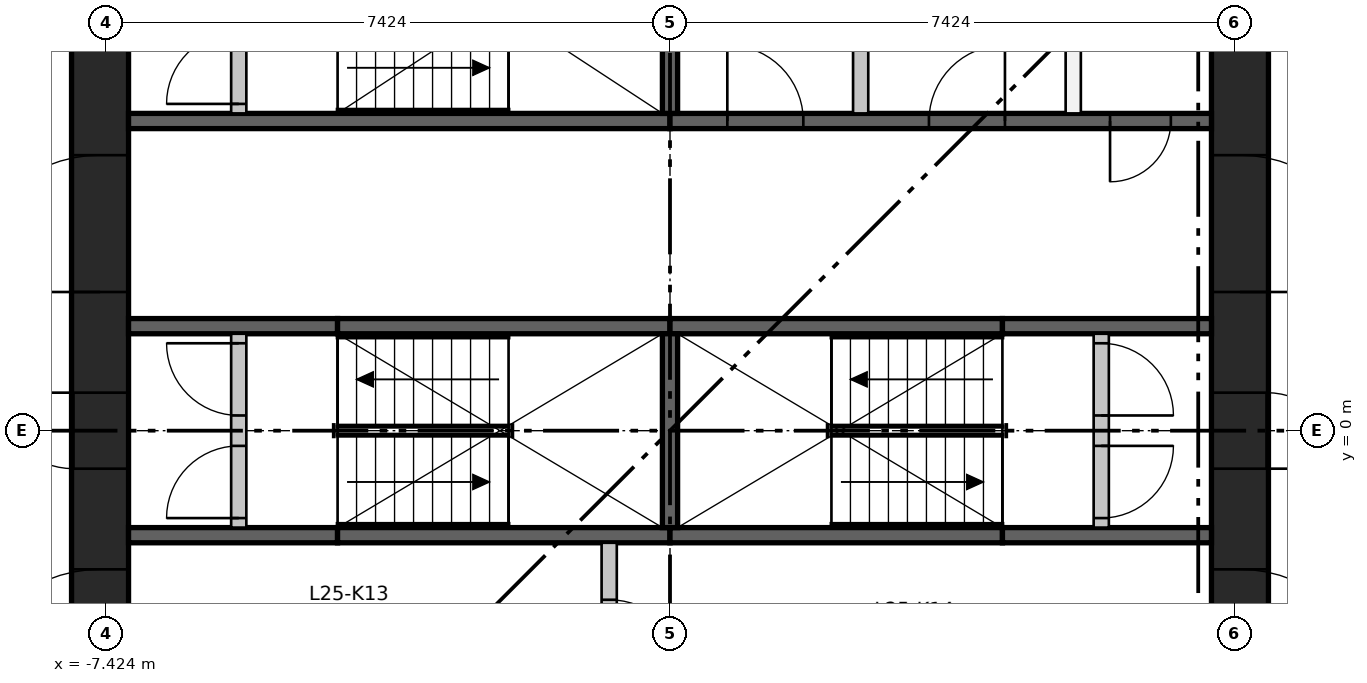
"""IFC4 building model, lengths in metres.
Left out: names, types, materials, properties, quantities, classifications, styles, units other than length and angle.
Written with IfcOpenShell. Run it as: python <this file> out.ifc"""

import sys

from ifc_helpers import new_model, si_unit, direction, frame, frame_2d, origin, place, context, subcontext, project, spatial, rectangle, extrude, element, fill, save


model = new_model("IFC4")
c1 = context("Model", 3, precision=1e-05, world=origin(), true_north=direction((0.0, 1.0)))
c2 = subcontext(c1, "Body", "Model", "MODEL_VIEW")
j1 = project(units=[si_unit("LENGTHUNIT", "METRE"), si_unit("PLANEANGLEUNIT", "RADIAN")], contexts=[c1])
p1 = place(None, origin())
s1 = spatial("IfcSite", under=j1, at=p1, CompositionType="ELEMENT")
p2 = place(p1, origin())
s2 = spatial("IfcBuilding", under=s1, at=p2, CompositionType="ELEMENT")
p3 = place(p2, frame((0.0, 0.0, 98.3)))
s3 = spatial("IfcBuildingStorey", under=s2, at=p3, CompositionType="ELEMENT", Elevation=98.3)
p4 = place(p3, frame((-7.499, -7.124, 0.0), z_axis=(0.0, 0.0, 1.0), x_axis=(0.0, 1.0, 0.0)))
e1 = element("IfcWall", 1, at=p4, inside=s3, PredefinedType="SHEAR", context=c2, shape_type="SweptSolid", body=[
    extrude(rectangle(XDim=14.248, YDim=0.75, at=frame_2d((7.124, 0.0))), origin(), (0.0, 0.0, 1.0), 3.65),
])
p5 = place(p4, frame((6.624, 0.0, 0.0)))
e2 = element("IfcOpeningElement", 2, at=p5, cuts=e1, PredefinedType="OPENING", context=c2, shape_type="SweptSolid", body=[
    extrude(rectangle(XDim=1.0, YDim=2.1, at=frame_2d((0.5, 1.05))), frame((0.0, 0.385, 0.0), z_axis=(0.0, -1.0, 0.0), x_axis=(1.0, 0.0, 0.0)), (0.0, 0.0, 1.0), 0.77),
])
p6 = place(p4, frame((3.5, 0.0, 0.0)))
e3 = element("IfcOpeningElement", 3, at=p6, cuts=e1, PredefinedType="OPENING", context=c2, shape_type="SweptSolid", body=[
    extrude(rectangle(XDim=1.8, YDim=2.1, at=frame_2d((0.9, 1.05))), frame((0.0, 0.385, 0.0), z_axis=(0.0, -1.0, 0.0), x_axis=(1.0, 0.0, 0.0)), (0.0, 0.0, 1.0), 0.77),
])
p7 = place(p4, frame((8.948, 0.0, 0.0)))
e4 = element("IfcOpeningElement", 4, at=p7, cuts=e1, PredefinedType="OPENING", context=c2, shape_type="SweptSolid", body=[
    extrude(rectangle(XDim=1.8, YDim=2.1, at=frame_2d((0.9, 1.05))), frame((0.0, 0.385, 0.0), z_axis=(0.0, -1.0, 0.0), x_axis=(1.0, 0.0, 0.0)), (0.0, 0.0, 1.0), 0.77),
])
p8 = place(p4, frame((12.124, 0.0, 0.0)))
e5 = element("IfcOpeningElement", 5, at=p8, cuts=e1, PredefinedType="OPENING", context=c2, shape_type="SweptSolid", body=[
    extrude(rectangle(XDim=1.0, YDim=2.1, at=frame_2d((0.5, 1.05))), frame((0.0, 0.385, 0.0), z_axis=(0.0, -1.0, 0.0), x_axis=(1.0, 0.0, 0.0)), (0.0, 0.0, 1.0), 0.77),
])
p9 = place(p3, frame((7.499, -7.124, 0.0), z_axis=(0.0, 0.0, 1.0), x_axis=(0.0, 1.0, 0.0)))
e6 = element("IfcWall", 6, at=p9, inside=s3, PredefinedType="SHEAR", context=c2, shape_type="SweptSolid", body=[
    extrude(rectangle(XDim=14.248, YDim=0.75, at=frame_2d((7.124, 0.0))), origin(), (0.0, 0.0, 1.0), 3.65),
])
p10 = place(p9, frame((6.624, 0.0, 0.0)))
e7 = element("IfcOpeningElement", 7, at=p10, cuts=e6, PredefinedType="OPENING", context=c2, shape_type="SweptSolid", body=[
    extrude(rectangle(XDim=1.0, YDim=2.1, at=frame_2d((0.5, 1.05))), frame((0.0, 0.385, 0.0), z_axis=(0.0, -1.0, 0.0), x_axis=(1.0, 0.0, 0.0)), (0.0, 0.0, 1.0), 0.77),
])
p11 = place(p9, frame((3.5, 0.0, 0.0)))
e8 = element("IfcOpeningElement", 8, at=p11, cuts=e6, PredefinedType="OPENING", context=c2, shape_type="SweptSolid", body=[
    extrude(rectangle(XDim=1.8, YDim=2.1, at=frame_2d((0.9, 1.05))), frame((0.0, 0.385, 0.0), z_axis=(0.0, -1.0, 0.0), x_axis=(1.0, 0.0, 0.0)), (0.0, 0.0, 1.0), 0.77),
])
p12 = place(p9, frame((8.948, 0.0, 0.0)))
e9 = element("IfcOpeningElement", 9, at=p12, cuts=e6, PredefinedType="OPENING", context=c2, shape_type="SweptSolid", body=[
    extrude(rectangle(XDim=1.8, YDim=2.1, at=frame_2d((0.9, 1.05))), frame((0.0, 0.385, 0.0), z_axis=(0.0, -1.0, 0.0), x_axis=(1.0, 0.0, 0.0)), (0.0, 0.0, 1.0), 0.77),
])
p13 = place(p3, frame((-7.124, 4.074, 0.0), z_axis=(0.0, 0.0, 1.0), x_axis=(1.0, 0.0, 0.0)))
e10 = element("IfcWall", 10, at=p13, inside=s3, PredefinedType="SHEAR", context=c2, shape_type="SweptSolid", body=[
    extrude(rectangle(XDim=7.124, YDim=0.2, at=frame_2d((3.562, 0.0))), origin(), (0.0, 0.0, 1.0), 3.3),
])
p14 = place(p3, frame((0.0, 4.074, 0.0), z_axis=(0.0, 0.0, 1.0), x_axis=(1.0, 0.0, 0.0)))
e11 = element("IfcWall", 11, at=p14, inside=s3, PredefinedType="SHEAR", context=c2, shape_type="SweptSolid", body=[
    extrude(rectangle(XDim=7.124, YDim=0.2, at=frame_2d((3.562, 0.0))), origin(), (0.0, 0.0, 1.0), 3.3),
])
p15 = place(p14, frame((0.754, 0.0, 0.0)))
e12 = element("IfcOpeningElement", 12, at=p15, cuts=e11, PredefinedType="OPENING", context=c2, shape_type="SweptSolid", body=[
    extrude(rectangle(XDim=1.0, YDim=2.1, at=frame_2d((0.5, 1.05))), frame((0.0, 0.11, 0.0), z_axis=(0.0, -1.0, 0.0), x_axis=(1.0, 0.0, 0.0)), (0.0, 0.0, 1.0), 0.22),
])
p16 = place(p14, frame((3.407, 0.0, 0.0)))
e13 = element("IfcOpeningElement", 13, at=p16, cuts=e11, PredefinedType="OPENING", context=c2, shape_type="SweptSolid", body=[
    extrude(rectangle(XDim=1.0, YDim=2.1, at=frame_2d((0.5, 1.05))), frame((0.0, 0.11, 0.0), z_axis=(0.0, -1.0, 0.0), x_axis=(1.0, 0.0, 0.0)), (0.0, 0.0, 1.0), 0.22),
])
p17 = place(p14, frame((5.79, 0.0, 0.0)))
e14 = element("IfcOpeningElement", 14, at=p17, cuts=e11, PredefinedType="OPENING", context=c2, shape_type="SweptSolid", body=[
    extrude(rectangle(XDim=0.8, YDim=2.1, at=frame_2d((0.4, 1.05))), frame((0.0, 0.11, 0.0), z_axis=(0.0, -1.0, 0.0), x_axis=(1.0, 0.0, 0.0)), (0.0, 0.0, 1.0), 0.22),
])
p18 = place(p3, frame((-7.124, -1.375, 0.0), z_axis=(0.0, 0.0, 1.0), x_axis=(1.0, 0.0, 0.0)))
e15 = element("IfcWall", 15, at=p18, inside=s3, PredefinedType="SHEAR", context=c2, shape_type="SweptSolid", body=[
    extrude(rectangle(XDim=2.75, YDim=0.2, at=frame_2d((1.375, 0.0))), origin(), (0.0, 0.0, 1.0), 3.3),
])
for number, where, z_axis, x_axis in (
    (16, (-4.374, -1.375, 0.0), (0.0, 0.0, 1.0), (1.0, 0.0, 0.0)),
    (17, (0.0, -1.375, 0.0), (0.0, 0.0, 1.0), (1.0, 0.0, 0.0)),
):
    element("IfcWall", number, at=place(p3, frame(where, z_axis=z_axis, x_axis=x_axis)), inside=s3, PredefinedType="SHEAR", context=c2, shape_type="SweptSolid", body=[
        extrude(rectangle(XDim=4.374, YDim=0.2, at=frame_2d((2.187, 0.0))), origin(), (0.0, 0.0, 1.0), 3.3),
    ])
for number, where, z_axis, x_axis in (
    (18, (4.374, -1.375, 0.0), (0.0, 0.0, 1.0), (1.0, 0.0, 0.0)),
    (19, (-7.124, 1.375, 0.0), (0.0, 0.0, 1.0), (1.0, 0.0, 0.0)),
):
    element("IfcWall", number, at=place(p3, frame(where, z_axis=z_axis, x_axis=x_axis)), inside=s3, PredefinedType="SHEAR", context=c2, shape_type="SweptSolid", body=[
        extrude(rectangle(XDim=2.75, YDim=0.2, at=frame_2d((1.375, 0.0))), origin(), (0.0, 0.0, 1.0), 3.3),
    ])
for number, where, z_axis, x_axis in (
    (20, (-4.374, 1.375, 0.0), (0.0, 0.0, 1.0), (1.0, 0.0, 0.0)),
    (21, (0.0, 1.375, 0.0), (0.0, 0.0, 1.0), (1.0, 0.0, 0.0)),
):
    element("IfcWall", number, at=place(p3, frame(where, z_axis=z_axis, x_axis=x_axis)), inside=s3, PredefinedType="SHEAR", context=c2, shape_type="SweptSolid", body=[
        extrude(rectangle(XDim=4.374, YDim=0.2, at=frame_2d((2.187, 0.0))), origin(), (0.0, 0.0, 1.0), 3.3),
    ])
p19 = place(p3, frame((4.374, 1.375, 0.0), z_axis=(0.0, 0.0, 1.0), x_axis=(1.0, 0.0, 0.0)))
e22 = element("IfcWall", 22, at=p19, inside=s3, PredefinedType="SHEAR", context=c2, shape_type="SweptSolid", body=[
    extrude(rectangle(XDim=2.75, YDim=0.2, at=frame_2d((1.375, 0.0))), origin(), (0.0, 0.0, 1.0), 3.3),
])
p20 = place(p3, frame((0.0, -1.275, 0.0), z_axis=(0.0, 0.0, 1.0), x_axis=(0.0, 1.0, 0.0)))
e23 = element("IfcWall", 23, at=p20, inside=s3, PredefinedType="SHEAR", context=c2, shape_type="SweptSolid", body=[
    extrude(rectangle(XDim=2.55, YDim=0.2, at=frame_2d((1.275, 0.0))), origin(), (0.0, 0.0, 1.0), 3.3),
])
p21 = place(p3, frame((-0.8, -3.974, 0.0), z_axis=(0.0, 0.0, 1.0), x_axis=(0.0, 1.0, 0.0)))
e24 = element("IfcWall", 24, at=p21, inside=s3, PredefinedType="PARTITIONING", context=c2, shape_type="SweptSolid", body=[
    extrude(rectangle(XDim=2.499, YDim=0.2, at=frame_2d((1.25, 0.0))), origin(), (0.0, 0.0, 1.0), 3.3),
])
p22 = place(p21, frame((0.75, 0.0, 0.0)))
e25 = element("IfcOpeningElement", 25, at=p22, cuts=e24, PredefinedType="OPENING", context=c2, shape_type="SweptSolid", body=[
    extrude(rectangle(XDim=1.0, YDim=2.1, at=frame_2d((0.5, 1.05))), frame((0.0, 0.11, 0.0), z_axis=(0.0, -1.0, 0.0), x_axis=(1.0, 0.0, 0.0)), (0.0, 0.0, 1.0), 0.22),
])
p23 = place(p3, frame((0.0, 4.174, 0.0), z_axis=(0.0, 0.0, 1.0), x_axis=(0.0, 1.0, 0.0)))
e26 = element("IfcWall", 26, at=p23, inside=s3, PredefinedType="SHEAR", context=c2, shape_type="SweptSolid", body=[
    extrude(rectangle(XDim=1.4, YDim=0.2, at=frame_2d((0.7, 0.0))), origin(), (0.0, 0.0, 1.0), 3.3),
])
for number, where, z_axis, x_axis in (
    (27, (2.509, 4.174, 0.0), (0.0, 0.0, 1.0), (0.0, 1.0, 0.0)),
    (28, (5.305, 4.174, 0.0), (0.0, 0.0, 1.0), (0.0, 1.0, 0.0)),
):
    element("IfcWall", number, at=place(p3, frame(where, z_axis=z_axis, x_axis=x_axis)), inside=s3, PredefinedType="PARTITIONING", context=c2, shape_type="SweptSolid", body=[
        extrude(rectangle(XDim=2.95, YDim=0.2, at=frame_2d((1.475, 0.0))), origin(), (0.0, 0.0, 1.0), 3.3),
    ])
p24 = place(p3, frame((-5.674, -1.275, 0.0), z_axis=(0.0, 0.0, 1.0), x_axis=(0.0, 1.0, 0.0)))
e29 = element("IfcWall", 29, at=p24, inside=s3, PredefinedType="PARTITIONING", context=c2, shape_type="SweptSolid", body=[
    extrude(rectangle(XDim=2.55, YDim=0.2, at=frame_2d((1.275, 0.0))), origin(), (0.0, 0.0, 1.0), 3.3),
])
p25 = place(p24, frame((0.125, 0.0, 0.0)))
e30 = element("IfcOpeningElement", 30, at=p25, cuts=e29, PredefinedType="OPENING", context=c2, shape_type="SweptSolid", body=[
    extrude(rectangle(XDim=0.95, YDim=2.1, at=frame_2d((0.475, 1.05))), frame((0.0, 0.11, 0.0), z_axis=(0.0, -1.0, 0.0), x_axis=(1.0, 0.0, 0.0)), (0.0, 0.0, 1.0), 0.22),
])
p26 = place(p24, frame((1.475, 0.0, 0.0)))
e31 = element("IfcOpeningElement", 31, at=p26, cuts=e29, PredefinedType="OPENING", context=c2, shape_type="SweptSolid", body=[
    extrude(rectangle(XDim=0.95, YDim=2.1, at=frame_2d((0.475, 1.05))), frame((0.0, 0.11, 0.0), z_axis=(0.0, -1.0, 0.0), x_axis=(1.0, 0.0, 0.0)), (0.0, 0.0, 1.0), 0.22),
])
p27 = place(p3, frame((5.674, -1.275, 0.0), z_axis=(0.0, 0.0, 1.0), x_axis=(0.0, 1.0, 0.0)))
e32 = element("IfcWall", 32, at=p27, inside=s3, PredefinedType="PARTITIONING", context=c2, shape_type="SweptSolid", body=[
    extrude(rectangle(XDim=2.55, YDim=0.2, at=frame_2d((1.275, 0.0))), origin(), (0.0, 0.0, 1.0), 3.3),
])
p28 = place(p27, frame((0.125, 0.0, 0.0)))
e33 = element("IfcOpeningElement", 33, at=p28, cuts=e32, PredefinedType="OPENING", context=c2, shape_type="SweptSolid", body=[
    extrude(rectangle(XDim=0.95, YDim=2.1, at=frame_2d((0.475, 1.05))), frame((0.0, 0.11, 0.0), z_axis=(0.0, -1.0, 0.0), x_axis=(1.0, 0.0, 0.0)), (0.0, 0.0, 1.0), 0.22),
])
p29 = place(p27, frame((1.475, 0.0, 0.0)))
e34 = element("IfcOpeningElement", 34, at=p29, cuts=e32, PredefinedType="OPENING", context=c2, shape_type="SweptSolid", body=[
    extrude(rectangle(XDim=0.95, YDim=2.1, at=frame_2d((0.475, 1.05))), frame((0.0, 0.11, 0.0), z_axis=(0.0, -1.0, 0.0), x_axis=(1.0, 0.0, 0.0)), (0.0, 0.0, 1.0), 0.22),
])
p30 = place(p3, frame((-5.674, 4.174, 0.0), z_axis=(0.0, 0.0, 1.0), x_axis=(0.0, 1.0, 0.0)))
e35 = element("IfcWall", 35, at=p30, inside=s3, PredefinedType="PARTITIONING", context=c2, shape_type="SweptSolid", body=[
    extrude(rectangle(XDim=2.95, YDim=0.2, at=frame_2d((1.475, 0.0))), origin(), (0.0, 0.0, 1.0), 3.3),
])
p31 = place(p30, frame((0.125, 0.0, 0.0)))
e36 = element("IfcOpeningElement", 36, at=p31, cuts=e35, PredefinedType="OPENING", context=c2, shape_type="SweptSolid", body=[
    extrude(rectangle(XDim=0.95, YDim=2.1, at=frame_2d((0.475, 1.05))), frame((0.0, 0.11, 0.0), z_axis=(0.0, -1.0, 0.0), x_axis=(1.0, 0.0, 0.0)), (0.0, 0.0, 1.0), 0.22),
])
p32 = place(p30, frame((1.725, 0.0, 0.0)))
e37 = element("IfcOpeningElement", 37, at=p32, cuts=e35, PredefinedType="OPENING", context=c2, shape_type="SweptSolid", body=[
    extrude(rectangle(XDim=0.95, YDim=2.1, at=frame_2d((0.475, 1.05))), frame((0.0, 0.11, 0.0), z_axis=(0.0, -1.0, 0.0), x_axis=(1.0, 0.0, 0.0)), (0.0, 0.0, 1.0), 0.22),
])
p33 = place(p25, origin())
e38 = element("IfcDoor", 38, at=p33, inside=s3, OperationType="SINGLE_SWING_LEFT", PredefinedType="DOOR", context=c2, shape_type="SweptSolid", body=[
    extrude(rectangle(XDim=0.95, YDim=2.1, at=frame_2d((0.475, 1.05))), frame((0.0, 0.025, 0.0), z_axis=(0.0, -1.0, 0.0), x_axis=(1.0, 0.0, 0.0)), (0.0, 0.0, 1.0), 0.05),
])
fill(e30, e38)
p34 = place(p26, origin())
e39 = element("IfcDoor", 39, at=p34, inside=s3, OperationType="SINGLE_SWING_RIGHT", PredefinedType="DOOR", context=c2, shape_type="SweptSolid", body=[
    extrude(rectangle(XDim=0.95, YDim=2.1, at=frame_2d((0.475, 1.05))), frame((0.0, 0.025, 0.0), z_axis=(0.0, -1.0, 0.0), x_axis=(1.0, 0.0, 0.0)), (0.0, 0.0, 1.0), 0.05),
])
fill(e31, e39)
p35 = place(p28, frame((0.95, 0.0, 0.0), z_axis=(0.0, 0.0, 1.0), x_axis=(-1.0, 0.0, 0.0)))
e40 = element("IfcDoor", 40, at=p35, inside=s3, OperationType="SINGLE_SWING_RIGHT", PredefinedType="DOOR", context=c2, shape_type="SweptSolid", body=[
    extrude(rectangle(XDim=0.95, YDim=2.1, at=frame_2d((0.475, 1.05))), frame((0.0, 0.025, 0.0), z_axis=(0.0, -1.0, 0.0), x_axis=(1.0, 0.0, 0.0)), (0.0, 0.0, 1.0), 0.05),
])
fill(e33, e40)
p36 = place(p29, frame((0.95, 0.0, 0.0), z_axis=(0.0, 0.0, 1.0), x_axis=(-1.0, 0.0, 0.0)))
e41 = element("IfcDoor", 41, at=p36, inside=s3, OperationType="SINGLE_SWING_LEFT", PredefinedType="DOOR", context=c2, shape_type="SweptSolid", body=[
    extrude(rectangle(XDim=0.95, YDim=2.1, at=frame_2d((0.475, 1.05))), frame((0.0, 0.025, 0.0), z_axis=(0.0, -1.0, 0.0), x_axis=(1.0, 0.0, 0.0)), (0.0, 0.0, 1.0), 0.05),
])
fill(e34, e41)
p37 = place(p31, origin())
e42 = element("IfcDoor", 42, at=p37, inside=s3, OperationType="SINGLE_SWING_LEFT", PredefinedType="DOOR", context=c2, shape_type="SweptSolid", body=[
    extrude(rectangle(XDim=0.95, YDim=2.1, at=frame_2d((0.475, 1.05))), frame((0.0, 0.025, 0.0), z_axis=(0.0, -1.0, 0.0), x_axis=(1.0, 0.0, 0.0)), (0.0, 0.0, 1.0), 0.05),
])
fill(e36, e42)
p38 = place(p22, frame((1.0, 0.0, 0.0), z_axis=(0.0, 0.0, 1.0), x_axis=(-1.0, 0.0, 0.0)))
e43 = element("IfcDoor", 43, at=p38, inside=s3, OperationType="SINGLE_SWING_LEFT", PredefinedType="DOOR", context=c2, shape_type="SweptSolid", body=[
    extrude(rectangle(XDim=1.0, YDim=2.1, at=frame_2d((0.5, 1.05))), frame((0.0, 0.025, 0.0), z_axis=(0.0, -1.0, 0.0), x_axis=(1.0, 0.0, 0.0)), (0.0, 0.0, 1.0), 0.05),
])
fill(e25, e43)
p39 = place(p15, origin())
e44 = element("IfcDoor", 44, at=p39, inside=s3, OperationType="SINGLE_SWING_LEFT", PredefinedType="DOOR", context=c2, shape_type="SweptSolid", body=[
    extrude(rectangle(XDim=1.0, YDim=2.1, at=frame_2d((0.5, 1.05))), frame((0.0, 0.025, 0.0), z_axis=(0.0, -1.0, 0.0), x_axis=(1.0, 0.0, 0.0)), (0.0, 0.0, 1.0), 0.05),
])
fill(e12, e44)
p40 = place(p16, origin())
e45 = element("IfcDoor", 45, at=p40, inside=s3, OperationType="SINGLE_SWING_RIGHT", PredefinedType="DOOR", context=c2, shape_type="SweptSolid", body=[
    extrude(rectangle(XDim=1.0, YDim=2.1, at=frame_2d((0.5, 1.05))), frame((0.0, 0.025, 0.0), z_axis=(0.0, -1.0, 0.0), x_axis=(1.0, 0.0, 0.0)), (0.0, 0.0, 1.0), 0.05),
])
fill(e13, e45)
p41 = place(p17, frame((0.8, 0.0, 0.0), z_axis=(0.0, 0.0, 1.0), x_axis=(-1.0, 0.0, 0.0)))
e46 = element("IfcDoor", 46, at=p41, inside=s3, OperationType="SINGLE_SWING_LEFT", PredefinedType="DOOR", context=c2, shape_type="SweptSolid", body=[
    extrude(rectangle(XDim=0.8, YDim=2.1, at=frame_2d((0.4, 1.05))), frame((0.0, 0.025, 0.0), z_axis=(0.0, -1.0, 0.0), x_axis=(1.0, 0.0, 0.0)), (0.0, 0.0, 1.0), 0.05),
])
fill(e14, e46)
p42 = place(p5, origin())
e47 = element("IfcDoor", 47, at=p42, inside=s3, OperationType="SINGLE_SWING_RIGHT", PredefinedType="DOOR", context=c2, shape_type="SweptSolid", body=[
    extrude(rectangle(XDim=1.0, YDim=2.1, at=frame_2d((0.5, 1.05))), frame((0.0, 0.375, 0.0), z_axis=(0.0, -1.0, 0.0), x_axis=(1.0, 0.0, 0.0)), (0.0, 0.0, 1.0), 0.05),
])
fill(e2, e47)
p43 = place(p6, origin())
e48 = element("IfcDoor", 48, at=p43, inside=s3, OperationType="DOUBLE_DOOR_SINGLE_SWING", PredefinedType="DOOR", context=c2, shape_type="SweptSolid", body=[
    extrude(rectangle(XDim=1.8, YDim=2.1, at=frame_2d((0.9, 1.05))), frame((0.0, 0.025, 0.0), z_axis=(0.0, -1.0, 0.0), x_axis=(1.0, 0.0, 0.0)), (0.0, 0.0, 1.0), 0.05),
])
fill(e3, e48)
p44 = place(p7, origin())
e49 = element("IfcDoor", 49, at=p44, inside=s3, OperationType="DOUBLE_DOOR_SINGLE_SWING", PredefinedType="DOOR", context=c2, shape_type="SweptSolid", body=[
    extrude(rectangle(XDim=1.8, YDim=2.1, at=frame_2d((0.9, 1.05))), frame((0.0, 0.025, 0.0), z_axis=(0.0, -1.0, 0.0), x_axis=(1.0, 0.0, 0.0)), (0.0, 0.0, 1.0), 0.05),
])
fill(e4, e49)
p45 = place(p10, frame((1.0, 0.0, 0.0), z_axis=(0.0, 0.0, 1.0), x_axis=(-1.0, 0.0, 0.0)))
e50 = element("IfcDoor", 50, at=p45, inside=s3, OperationType="SINGLE_SWING_LEFT", PredefinedType="DOOR", context=c2, shape_type="SweptSolid", body=[
    extrude(rectangle(XDim=1.0, YDim=2.1, at=frame_2d((0.5, 1.05))), frame((0.0, 0.375, 0.0), z_axis=(0.0, -1.0, 0.0), x_axis=(1.0, 0.0, 0.0)), (0.0, 0.0, 1.0), 0.05),
])
fill(e7, e50)
p46 = place(p11, frame((1.8, 0.0, 0.0), z_axis=(0.0, 0.0, 1.0), x_axis=(-1.0, 0.0, 0.0)))
e51 = element("IfcDoor", 51, at=p46, inside=s3, OperationType="DOUBLE_DOOR_SINGLE_SWING", PredefinedType="DOOR", context=c2, shape_type="SweptSolid", body=[
    extrude(rectangle(XDim=1.8, YDim=2.1, at=frame_2d((0.9, 1.05))), frame((0.0, 0.025, 0.0), z_axis=(0.0, -1.0, 0.0), x_axis=(1.0, 0.0, 0.0)), (0.0, 0.0, 1.0), 0.05),
])
fill(e8, e51)
p47 = place(p12, frame((1.8, 0.0, 0.0), z_axis=(0.0, 0.0, 1.0), x_axis=(-1.0, 0.0, 0.0)))
e52 = element("IfcDoor", 52, at=p47, inside=s3, OperationType="DOUBLE_DOOR_SINGLE_SWING", PredefinedType="DOOR", context=c2, shape_type="SweptSolid", body=[
    extrude(rectangle(XDim=1.8, YDim=2.1, at=frame_2d((0.9, 1.05))), frame((0.0, 0.025, 0.0), z_axis=(0.0, -1.0, 0.0), x_axis=(1.0, 0.0, 0.0)), (0.0, 0.0, 1.0), 0.05),
])
fill(e9, e52)
save(model, sys.argv[1])
